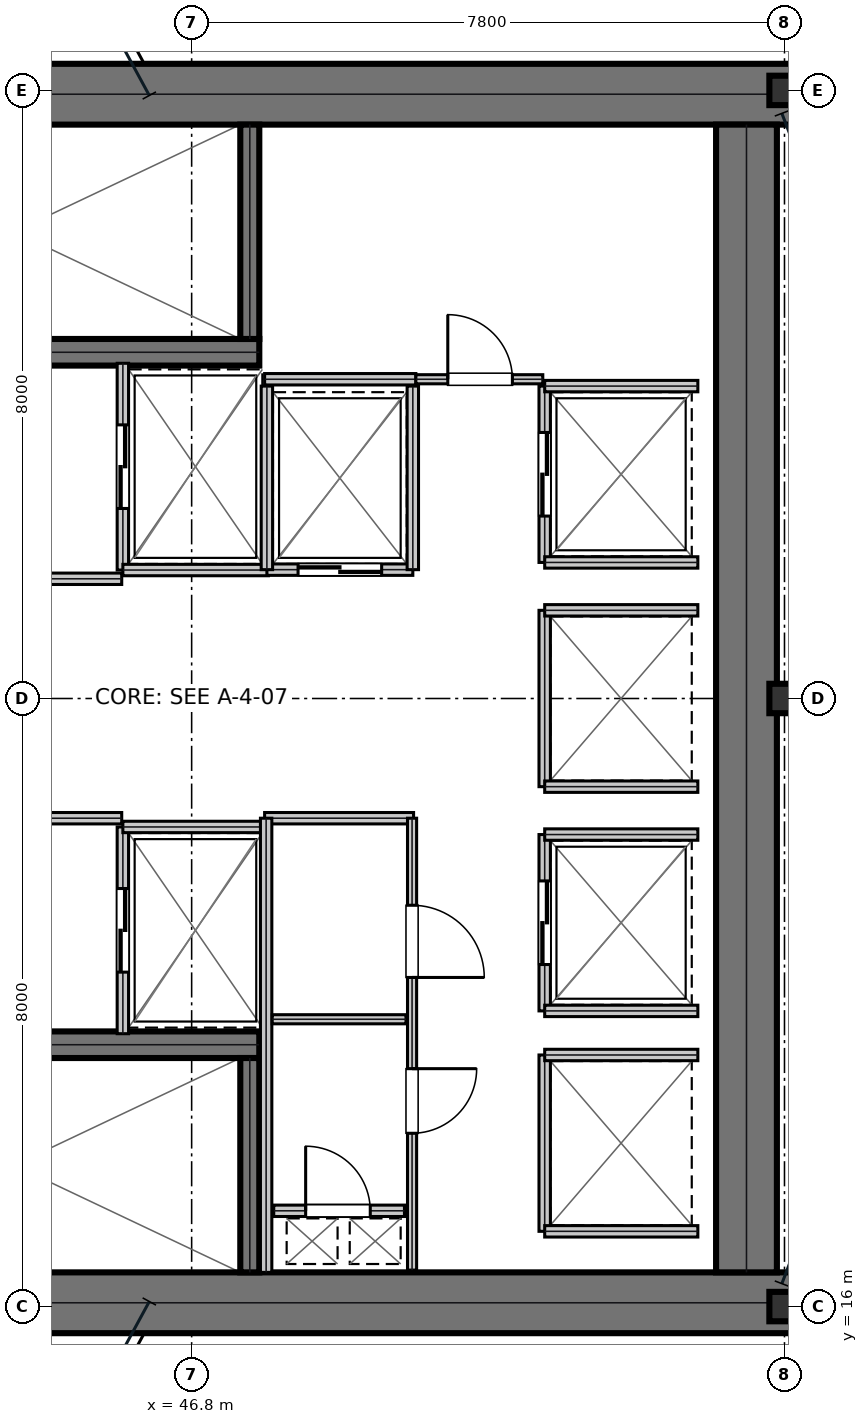
"""IFC4 building model, lengths in metres.
Left out: names, types, materials, properties, quantities, classifications, styles, units other than length and angle.
Written with IfcOpenShell. Run it as: python <this file> out.ifc"""

import sys

from ifc_helpers import new_model, si_unit, direction, frame, frame_2d, origin, origin_2d, place, context, subcontext, project, spatial, rectangle, i_section, extrude, element, fill, save


model = new_model("IFC4")
c1 = context("Model", 3, precision=1e-05, world=origin(), true_north=direction((0.0, 1.0)))
c2 = subcontext(c1, "Body", "Model", "MODEL_VIEW")
j1 = project(units=[si_unit("LENGTHUNIT", "METRE"), si_unit("PLANEANGLEUNIT", "RADIAN")], contexts=[c1])
p1 = place(None, origin())
s1 = spatial("IfcSite", under=j1, at=p1, CompositionType="ELEMENT")
p2 = place(p1, origin())
s2 = spatial("IfcBuilding", under=s1, at=p2, CompositionType="ELEMENT")
p3 = place(p2, frame((0.0, 0.0, 153.3)))
s3 = spatial("IfcBuildingStorey", under=s2, at=p3, CompositionType="ELEMENT", Elevation=153.3)
for number, where, z_axis, x_axis in (
    (1, (38.8, 31.95, 0.0), (0.0, 0.0, 1.0), (1.0, 0.0, 0.0)),
    (2, (38.8, 16.05, 0.0), (0.0, 0.0, 1.0), (1.0, 0.0, 0.0)),
):
    element("IfcWall", number, at=place(p3, frame(where, z_axis=z_axis, x_axis=x_axis)), inside=s3, PredefinedType="SHEAR", context=c2, shape_type="SweptSolid", body=[
        extrude(rectangle(XDim=16.0, YDim=0.8, at=frame_2d((8.0, 0.0))), origin(), (0.0, 0.0, 1.0), 3.81),
    ])
p4 = place(p3, frame((54.1, 16.45, 0.0), z_axis=(0.0, 0.0, 1.0), x_axis=(0.0, 1.0, 0.0)))
e3 = element("IfcWall", 3, at=p4, inside=s3, PredefinedType="SHEAR", context=c2, shape_type="SweptSolid", body=[
    extrude(rectangle(XDim=15.1, YDim=0.8, at=frame_2d((7.55, 0.0))), origin(), (0.0, 0.0, 1.0), 3.81),
])
p5 = place(p3, frame((39.98, 28.555, 0.0), z_axis=(0.0, 0.0, 1.0), x_axis=(1.0, 0.0, 0.0)))
e4 = element("IfcWall", 4, at=p5, inside=s3, PredefinedType="SHEAR", context=c2, shape_type="SweptSolid", body=[
    extrude(rectangle(XDim=7.71, YDim=0.35, at=frame_2d((3.855, 0.0))), origin(), (0.0, 0.0, 1.0), 3.81),
])
p6 = place(p5, frame((0.25, 0.0, 0.0)))
e5 = element("IfcOpeningElement", 5, at=p6, cuts=e4, PredefinedType="OPENING", context=c2, shape_type="SweptSolid", body=[
    extrude(rectangle(XDim=1.1, YDim=2.15, at=frame_2d((0.55, 1.075))), frame((0.0, 0.185, 0.0), z_axis=(0.0, -1.0, 0.0), x_axis=(1.0, 0.0, 0.0)), (0.0, 0.0, 1.0), 0.37),
])
p7 = place(p3, frame((39.98, 19.445, 0.0), z_axis=(0.0, 0.0, 1.0), x_axis=(1.0, 0.0, 0.0)))
e6 = element("IfcWall", 6, at=p7, inside=s3, PredefinedType="SHEAR", context=c2, shape_type="SweptSolid", body=[
    extrude(rectangle(XDim=7.71, YDim=0.35, at=frame_2d((3.855, 0.0))), origin(), (0.0, 0.0, 1.0), 3.81),
])
p8 = place(p7, frame((0.25, 0.0, 0.0)))
e7 = element("IfcOpeningElement", 7, at=p8, cuts=e6, PredefinedType="OPENING", context=c2, shape_type="SweptSolid", body=[
    extrude(rectangle(XDim=1.1, YDim=2.15, at=frame_2d((0.55, 1.075))), frame((0.0, 0.185, 0.0), z_axis=(0.0, -1.0, 0.0), x_axis=(1.0, 0.0, 0.0)), (0.0, 0.0, 1.0), 0.37),
])
for number, where, z_axis, x_axis in (
    (8, (47.565, 28.73, 0.0), (0.0, 0.0, 1.0), (0.0, 1.0, 0.0)),
    (9, (47.565, 16.45, 0.0), (0.0, 0.0, 1.0), (0.0, 1.0, 0.0)),
):
    element("IfcWall", number, at=place(p3, frame(where, z_axis=z_axis, x_axis=x_axis)), inside=s3, PredefinedType="SHEAR", context=c2, shape_type="SweptSolid", body=[
        extrude(rectangle(XDim=2.82, YDim=0.25, at=frame_2d((1.41, 0.0))), origin(), (0.0, 0.0, 1.0), 3.81),
    ])
for number, where, z_axis, x_axis in (
    (10, (54.6, 16.0, 0.0), (0.0, 0.0, 1.0), (1.0, 0.0, 0.0)),
    (11, (54.6, 24.0, 0.0), (0.0, 0.0, 1.0), (1.0, 0.0, 0.0)),
    (12, (54.6, 32.0, 0.0), (0.0, 0.0, 1.0), (1.0, 0.0, 0.0)),
):
    element("IfcColumn", number, at=place(p3, frame(where, z_axis=z_axis, x_axis=x_axis)), inside=s3, PredefinedType="COLUMN", context=c2, shape_type="SweptSolid", body=[
        extrude(i_section(OverallWidth=0.398, OverallDepth=0.387, WebThickness=0.021, FlangeThickness=0.033, at=origin_2d()), origin(), (0.0, 0.0, 1.0), 4.044),
    ])
p9 = place(p3, frame((39.98, 25.575, 0.0), z_axis=(0.0, 0.0, 1.0), x_axis=(1.0, 0.0, 0.0)))
e13 = element("IfcWall", 13, at=p9, inside=s3, PredefinedType="PARTITIONING", context=c2, shape_type="SweptSolid", body=[
    extrude(rectangle(XDim=5.9, YDim=0.15, at=frame_2d((2.95, 0.0))), origin(), (0.0, 0.0, 1.0), 3.81),
])
p10 = place(p9, frame((2.35, 0.0, 0.0)))
e14 = element("IfcOpeningElement", 14, at=p10, cuts=e13, PredefinedType="OPENING", context=c2, shape_type="SweptSolid", body=[
    extrude(rectangle(XDim=1.05, YDim=2.15, at=frame_2d((0.525, 1.075))), frame((0.0, 0.085, 0.0), z_axis=(0.0, -1.0, 0.0), x_axis=(1.0, 0.0, 0.0)), (0.0, 0.0, 1.0), 0.17),
])
p11 = place(p3, frame((39.98, 22.425, 0.0), z_axis=(0.0, 0.0, 1.0), x_axis=(1.0, 0.0, 0.0)))
e15 = element("IfcWall", 15, at=p11, inside=s3, PredefinedType="PARTITIONING", context=c2, shape_type="SweptSolid", body=[
    extrude(rectangle(XDim=5.9, YDim=0.15, at=frame_2d((2.95, 0.0))), origin(), (0.0, 0.0, 1.0), 3.81),
])
p12 = place(p11, frame((2.35, 0.0, 0.0)))
e16 = element("IfcOpeningElement", 16, at=p12, cuts=e15, PredefinedType="OPENING", context=c2, shape_type="SweptSolid", body=[
    extrude(rectangle(XDim=1.05, YDim=2.15, at=frame_2d((0.525, 1.075))), frame((0.0, 0.085, 0.0), z_axis=(0.0, -1.0, 0.0), x_axis=(1.0, 0.0, 0.0)), (0.0, 0.0, 1.0), 0.17),
])
p13 = place(p3, frame((45.895, 25.69, 0.0), z_axis=(0.0, 0.0, 1.0), x_axis=(0.0, 1.0, 0.0)))
e17 = element("IfcWall", 17, at=p13, inside=s3, PredefinedType="PARTITIONING", context=c2, shape_type="SweptSolid", body=[
    extrude(rectangle(XDim=2.72, YDim=0.15, at=frame_2d((1.36, 0.0))), origin(), (0.0, 0.0, 1.0), 3.81),
])
p14 = place(p13, frame((0.81, 0.0, 0.0)))
e18 = element("IfcOpeningElement", 18, at=p14, cuts=e17, PredefinedType="OPENING", context=c2, shape_type="SweptSolid", body=[
    extrude(rectangle(XDim=1.1, YDim=2.15, at=frame_2d((0.55, 1.075))), frame((0.0, 0.085, 0.0), z_axis=(0.0, -1.0, 0.0), x_axis=(1.0, 0.0, 0.0)), (0.0, 0.0, 1.0), 0.17),
])
p15 = place(p3, frame((45.895, 25.69, 0.0), z_axis=(0.0, 0.0, 1.0), x_axis=(1.0, 0.0, 0.0)))
e19 = element("IfcWall", 19, at=p15, inside=s3, PredefinedType="PARTITIONING", context=c2, shape_type="SweptSolid", body=[
    extrude(rectangle(XDim=1.915, YDim=0.15, at=frame_2d((0.958, 0.0))), origin(), (0.0, 0.0, 1.0), 3.81),
])
p16 = place(p3, frame((45.895, 19.59, 0.0), z_axis=(0.0, 0.0, 1.0), x_axis=(0.0, 1.0, 0.0)))
e20 = element("IfcWall", 20, at=p16, inside=s3, PredefinedType="PARTITIONING", context=c2, shape_type="SweptSolid", body=[
    extrude(rectangle(XDim=2.72, YDim=0.15, at=frame_2d((1.36, 0.0))), origin(), (0.0, 0.0, 1.0), 3.81),
])
p17 = place(p16, frame((0.81, 0.0, 0.0)))
e21 = element("IfcOpeningElement", 21, at=p17, cuts=e20, PredefinedType="OPENING", context=c2, shape_type="SweptSolid", body=[
    extrude(rectangle(XDim=1.1, YDim=2.15, at=frame_2d((0.55, 1.075))), frame((0.0, 0.085, 0.0), z_axis=(0.0, -1.0, 0.0), x_axis=(1.0, 0.0, 0.0)), (0.0, 0.0, 1.0), 0.17),
])
p18 = place(p3, frame((45.895, 22.31, 0.0), z_axis=(0.0, 0.0, 1.0), x_axis=(1.0, 0.0, 0.0)))
e22 = element("IfcWall", 22, at=p18, inside=s3, PredefinedType="PARTITIONING", context=c2, shape_type="SweptSolid", body=[
    extrude(rectangle(XDim=1.915, YDim=0.15, at=frame_2d((0.958, 0.0))), origin(), (0.0, 0.0, 1.0), 3.81),
])
p19 = place(p3, frame((47.79, 25.695, 0.0), z_axis=(0.0, 0.0, 1.0), x_axis=(1.0, 0.0, 0.0)))
e23 = element("IfcWall", 23, at=p19, inside=s3, PredefinedType="PARTITIONING", context=c2, shape_type="SweptSolid", body=[
    extrude(rectangle(XDim=1.92, YDim=0.15, at=frame_2d((0.96, 0.0))), origin(), (0.0, 0.0, 1.0), 3.81),
])
p20 = place(p19, frame((0.41, 0.0, 0.0)))
e24 = element("IfcOpeningElement", 24, at=p20, cuts=e23, PredefinedType="OPENING", context=c2, shape_type="SweptSolid", body=[
    extrude(rectangle(XDim=1.1, YDim=2.15, at=frame_2d((0.55, 1.075))), frame((0.0, 0.085, 0.0), z_axis=(0.0, -1.0, 0.0), x_axis=(1.0, 0.0, 0.0)), (0.0, 0.0, 1.0), 0.17),
])
for number, where, z_axis, x_axis in (
    (25, (47.79, 25.695, 0.0), (0.0, 0.0, 1.0), (0.0, 1.0, 0.0)),
    (26, (49.71, 25.695, 0.0), (0.0, 0.0, 1.0), (0.0, 1.0, 0.0)),
):
    element("IfcWall", number, at=place(p3, frame(where, z_axis=z_axis, x_axis=x_axis)), inside=s3, PredefinedType="PARTITIONING", context=c2, shape_type="SweptSolid", body=[
        extrude(rectangle(XDim=2.415, YDim=0.15, at=frame_2d((1.208, 0.0))), origin(), (0.0, 0.0, 1.0), 3.81),
    ])
p21 = place(p3, frame((51.445, 25.79, 0.0), z_axis=(0.0, 0.0, 1.0), x_axis=(0.0, 1.0, 0.0)))
e27 = element("IfcWall", 27, at=p21, inside=s3, PredefinedType="PARTITIONING", context=c2, shape_type="SweptSolid", body=[
    extrude(rectangle(XDim=2.32, YDim=0.15, at=frame_2d((1.16, 0.0))), origin(), (0.0, 0.0, 1.0), 3.81),
])
p22 = place(p21, frame((0.61, 0.0, 0.0)))
e28 = element("IfcOpeningElement", 28, at=p22, cuts=e27, PredefinedType="OPENING", context=c2, shape_type="SweptSolid", body=[
    extrude(rectangle(XDim=1.1, YDim=2.15, at=frame_2d((0.55, 1.075))), frame((0.0, 0.085, 0.0), z_axis=(0.0, -1.0, 0.0), x_axis=(1.0, 0.0, 0.0)), (0.0, 0.0, 1.0), 0.17),
])
for number, where, z_axis, x_axis in (
    (29, (51.445, 25.79, 0.0), (0.0, 0.0, 1.0), (1.0, 0.0, 0.0)),
    (30, (51.445, 28.11, 0.0), (0.0, 0.0, 1.0), (1.0, 0.0, 0.0)),
):
    element("IfcWall", number, at=place(p3, frame(where, z_axis=z_axis, x_axis=x_axis)), inside=s3, PredefinedType="PARTITIONING", context=c2, shape_type="SweptSolid", body=[
        extrude(rectangle(XDim=2.015, YDim=0.15, at=frame_2d((1.007, 0.0))), origin(), (0.0, 0.0, 1.0), 3.81),
    ])
p23 = place(p3, frame((51.445, 19.89, 0.0), z_axis=(0.0, 0.0, 1.0), x_axis=(0.0, 1.0, 0.0)))
e31 = element("IfcWall", 31, at=p23, inside=s3, PredefinedType="PARTITIONING", context=c2, shape_type="SweptSolid", body=[
    extrude(rectangle(XDim=2.32, YDim=0.15, at=frame_2d((1.16, 0.0))), origin(), (0.0, 0.0, 1.0), 3.81),
])
p24 = place(p23, frame((0.61, 0.0, 0.0)))
e32 = element("IfcOpeningElement", 32, at=p24, cuts=e31, PredefinedType="OPENING", context=c2, shape_type="SweptSolid", body=[
    extrude(rectangle(XDim=1.1, YDim=2.15, at=frame_2d((0.55, 1.075))), frame((0.0, 0.085, 0.0), z_axis=(0.0, -1.0, 0.0), x_axis=(1.0, 0.0, 0.0)), (0.0, 0.0, 1.0), 0.17),
])
for number, where, z_axis, x_axis in (
    (33, (51.445, 19.89, 0.0), (0.0, 0.0, 1.0), (1.0, 0.0, 0.0)),
    (34, (51.445, 22.21, 0.0), (0.0, 0.0, 1.0), (1.0, 0.0, 0.0)),
):
    element("IfcWall", number, at=place(p3, frame(where, z_axis=z_axis, x_axis=x_axis)), inside=s3, PredefinedType="PARTITIONING", context=c2, shape_type="SweptSolid", body=[
        extrude(rectangle(XDim=2.015, YDim=0.15, at=frame_2d((1.007, 0.0))), origin(), (0.0, 0.0, 1.0), 3.81),
    ])
p25 = place(p3, frame((51.445, 22.84, 0.0), z_axis=(0.0, 0.0, 1.0), x_axis=(0.0, 1.0, 0.0)))
e35 = element("IfcWall", 35, at=p25, inside=s3, PredefinedType="PARTITIONING", context=c2, shape_type="SweptSolid", body=[
    extrude(rectangle(XDim=2.32, YDim=0.15, at=frame_2d((1.16, 0.0))), origin(), (0.0, 0.0, 1.0), 3.81),
])
for number, where, z_axis, x_axis in (
    (36, (51.445, 22.84, 0.0), (0.0, 0.0, 1.0), (1.0, 0.0, 0.0)),
    (37, (51.445, 25.16, 0.0), (0.0, 0.0, 1.0), (1.0, 0.0, 0.0)),
):
    element("IfcWall", number, at=place(p3, frame(where, z_axis=z_axis, x_axis=x_axis)), inside=s3, PredefinedType="PARTITIONING", context=c2, shape_type="SweptSolid", body=[
        extrude(rectangle(XDim=2.015, YDim=0.15, at=frame_2d((1.007, 0.0))), origin(), (0.0, 0.0, 1.0), 3.81),
    ])
p26 = place(p3, frame((51.445, 16.99, 0.0), z_axis=(0.0, 0.0, 1.0), x_axis=(0.0, 1.0, 0.0)))
e38 = element("IfcWall", 38, at=p26, inside=s3, PredefinedType="PARTITIONING", context=c2, shape_type="SweptSolid", body=[
    extrude(rectangle(XDim=2.32, YDim=0.15, at=frame_2d((1.16, 0.0))), origin(), (0.0, 0.0, 1.0), 3.81),
])
for number, where, z_axis, x_axis in (
    (39, (51.445, 16.99, 0.0), (0.0, 0.0, 1.0), (1.0, 0.0, 0.0)),
    (40, (51.445, 19.31, 0.0), (0.0, 0.0, 1.0), (1.0, 0.0, 0.0)),
):
    element("IfcWall", number, at=place(p3, frame(where, z_axis=z_axis, x_axis=x_axis)), inside=s3, PredefinedType="PARTITIONING", context=c2, shape_type="SweptSolid", body=[
        extrude(rectangle(XDim=2.015, YDim=0.15, at=frame_2d((1.007, 0.0))), origin(), (0.0, 0.0, 1.0), 3.81),
    ])
p27 = place(p3, frame((47.88, 17.26, 0.0), z_axis=(0.0, 0.0, 1.0), x_axis=(1.0, 0.0, 0.0)))
e41 = element("IfcWall", 41, at=p27, inside=s3, PredefinedType="PARTITIONING", context=c2, shape_type="SweptSolid", body=[
    extrude(rectangle(XDim=1.72, YDim=0.15, at=frame_2d((0.86, 0.0))), origin(), (0.0, 0.0, 1.0), 3.81),
])
p28 = place(p27, frame((0.42, 0.0, 0.0)))
e42 = element("IfcOpeningElement", 42, at=p28, cuts=e41, PredefinedType="OPENING", context=c2, shape_type="SweptSolid", body=[
    extrude(rectangle(XDim=0.85, YDim=2.15, at=frame_2d((0.425, 1.075))), frame((0.0, 0.085, 0.0), z_axis=(0.0, -1.0, 0.0), x_axis=(1.0, 0.0, 0.0)), (0.0, 0.0, 1.0), 0.17),
])
p29 = place(p3, frame((47.76, 22.425, 0.0), z_axis=(0.0, 0.0, 1.0), x_axis=(1.0, 0.0, 0.0)))
e43 = element("IfcWall", 43, at=p29, inside=s3, PredefinedType="PARTITIONING", context=c2, shape_type="SweptSolid", body=[
    extrude(rectangle(XDim=1.96, YDim=0.15, at=frame_2d((0.98, 0.0))), origin(), (0.0, 0.0, 1.0), 3.81),
])
p30 = place(p3, frame((47.78, 16.45, 0.0), z_axis=(0.0, 0.0, 1.0), x_axis=(0.0, 1.0, 0.0)))
e44 = element("IfcWall", 44, at=p30, inside=s3, PredefinedType="PARTITIONING", context=c2, shape_type="SweptSolid", body=[
    extrude(rectangle(XDim=5.975, YDim=0.15, at=frame_2d((2.988, 0.0))), origin(), (0.0, 0.0, 1.0), 3.81),
])
p31 = place(p3, frame((47.86, 19.78, 0.0), z_axis=(0.0, 0.0, 1.0), x_axis=(1.0, 0.0, 0.0)))
e45 = element("IfcWall", 45, at=p31, inside=s3, PredefinedType="PARTITIONING", context=c2, shape_type="SweptSolid", body=[
    extrude(rectangle(XDim=1.76, YDim=0.12, at=frame_2d((0.88, 0.0))), origin(), (0.0, 0.0, 1.0), 3.81),
])
p32 = place(p3, frame((49.7, 16.48, 0.0), z_axis=(0.0, 0.0, 1.0), x_axis=(0.0, 1.0, 0.0)))
e46 = element("IfcWall", 46, at=p32, inside=s3, PredefinedType="PARTITIONING", context=c2, shape_type="SweptSolid", body=[
    extrude(rectangle(XDim=5.945, YDim=0.12, at=frame_2d((2.973, 0.0))), origin(), (0.0, 0.0, 1.0), 3.81),
])
p33 = place(p32, frame((1.8, 0.0, 0.0)))
e47 = element("IfcOpeningElement", 47, at=p33, cuts=e46, PredefinedType="OPENING", context=c2, shape_type="SweptSolid", body=[
    extrude(rectangle(XDim=0.85, YDim=2.15, at=frame_2d((0.425, 1.075))), frame((0.0, 0.07, 0.0), z_axis=(0.0, -1.0, 0.0), x_axis=(1.0, 0.0, 0.0)), (0.0, 0.0, 1.0), 0.14),
])
p34 = place(p32, frame((3.85, 0.0, 0.0)))
e48 = element("IfcOpeningElement", 48, at=p34, cuts=e46, PredefinedType="OPENING", context=c2, shape_type="SweptSolid", body=[
    extrude(rectangle(XDim=0.95, YDim=2.15, at=frame_2d((0.475, 1.075))), frame((0.0, 0.07, 0.0), z_axis=(0.0, -1.0, 0.0), x_axis=(1.0, 0.0, 0.0)), (0.0, 0.0, 1.0), 0.14),
])
p35 = place(p3, frame((47.76, 28.2, 0.0), z_axis=(0.0, 0.0, 1.0), x_axis=(1.0, 0.0, 0.0)))
e49 = element("IfcWall", 49, at=p35, inside=s3, PredefinedType="PARTITIONING", context=c2, shape_type="SweptSolid", body=[
    extrude(rectangle(XDim=1.99, YDim=0.15, at=frame_2d((0.995, 0.0))), origin(), (0.0, 0.0, 1.0), 3.81),
])
p36 = place(p3, frame((49.75, 28.2, 0.0), z_axis=(0.0, 0.0, 1.0), x_axis=(1.0, 0.0, 0.0)))
e50 = element("IfcWall", 50, at=p36, inside=s3, PredefinedType="PARTITIONING", context=c2, shape_type="SweptSolid", body=[
    extrude(rectangle(XDim=1.67, YDim=0.12, at=frame_2d((0.835, 0.0))), origin(), (0.0, 0.0, 1.0), 3.81),
])
p37 = place(p36, frame((0.42, 0.0, 0.0)))
e51 = element("IfcOpeningElement", 51, at=p37, cuts=e50, PredefinedType="OPENING", context=c2, shape_type="SweptSolid", body=[
    extrude(rectangle(XDim=0.85, YDim=2.15, at=frame_2d((0.425, 1.075))), frame((0.0, 0.07, 0.0), z_axis=(0.0, -1.0, 0.0), x_axis=(1.0, 0.0, 0.0)), (0.0, 0.0, 1.0), 0.14),
])
p38 = place(p14, frame((1.1, 0.0, 0.0), z_axis=(0.0, 0.0, 1.0), x_axis=(-1.0, 0.0, 0.0)))
e52 = element("IfcDoor", 52, at=p38, inside=s3, OperationType="DOUBLE_DOOR_SLIDING", PredefinedType="DOOR", context=c2, shape_type="SweptSolid", body=[
    extrude(rectangle(XDim=1.1, YDim=2.15, at=frame_2d((0.55, 1.075))), frame((0.0, 0.025, 0.0), z_axis=(0.0, -1.0, 0.0), x_axis=(1.0, 0.0, 0.0)), (0.0, 0.0, 1.0), 0.05),
])
fill(e18, e52)
p39 = place(p17, frame((1.1, 0.0, 0.0), z_axis=(0.0, 0.0, 1.0), x_axis=(-1.0, 0.0, 0.0)))
e53 = element("IfcDoor", 53, at=p39, inside=s3, OperationType="DOUBLE_DOOR_SLIDING", PredefinedType="DOOR", context=c2, shape_type="SweptSolid", body=[
    extrude(rectangle(XDim=1.1, YDim=2.15, at=frame_2d((0.55, 1.075))), frame((0.0, 0.025, 0.0), z_axis=(0.0, -1.0, 0.0), x_axis=(1.0, 0.0, 0.0)), (0.0, 0.0, 1.0), 0.05),
])
fill(e21, e53)
p40 = place(p20, frame((1.1, 0.0, 0.0), z_axis=(0.0, 0.0, 1.0), x_axis=(-1.0, 0.0, 0.0)))
e54 = element("IfcDoor", 54, at=p40, inside=s3, OperationType="DOUBLE_DOOR_SLIDING", PredefinedType="DOOR", context=c2, shape_type="SweptSolid", body=[
    extrude(rectangle(XDim=1.1, YDim=2.15, at=frame_2d((0.55, 1.075))), frame((0.0, 0.025, 0.0), z_axis=(0.0, -1.0, 0.0), x_axis=(1.0, 0.0, 0.0)), (0.0, 0.0, 1.0), 0.05),
])
fill(e24, e54)
p41 = place(p22, frame((1.1, 0.0, 0.0), z_axis=(0.0, 0.0, 1.0), x_axis=(-1.0, 0.0, 0.0)))
e55 = element("IfcDoor", 55, at=p41, inside=s3, OperationType="DOUBLE_DOOR_SLIDING", PredefinedType="DOOR", context=c2, shape_type="SweptSolid", body=[
    extrude(rectangle(XDim=1.1, YDim=2.15, at=frame_2d((0.55, 1.075))), frame((0.0, 0.025, 0.0), z_axis=(0.0, -1.0, 0.0), x_axis=(1.0, 0.0, 0.0)), (0.0, 0.0, 1.0), 0.05),
])
fill(e28, e55)
p42 = place(p24, frame((1.1, 0.0, 0.0), z_axis=(0.0, 0.0, 1.0), x_axis=(-1.0, 0.0, 0.0)))
e56 = element("IfcDoor", 56, at=p42, inside=s3, OperationType="DOUBLE_DOOR_SLIDING", PredefinedType="DOOR", context=c2, shape_type="SweptSolid", body=[
    extrude(rectangle(XDim=1.1, YDim=2.15, at=frame_2d((0.55, 1.075))), frame((0.0, 0.025, 0.0), z_axis=(0.0, -1.0, 0.0), x_axis=(1.0, 0.0, 0.0)), (0.0, 0.0, 1.0), 0.05),
])
fill(e32, e56)
p43 = place(p28, origin())
e57 = element("IfcDoor", 57, at=p43, inside=s3, OperationType="SINGLE_SWING_LEFT", PredefinedType="TRAPDOOR", context=c2, shape_type="SweptSolid", body=[
    extrude(rectangle(XDim=0.85, YDim=2.15, at=frame_2d((0.425, 1.075))), frame((0.0, 0.025, 0.0), z_axis=(0.0, -1.0, 0.0), x_axis=(1.0, 0.0, 0.0)), (0.0, 0.0, 1.0), 0.05),
])
fill(e42, e57)
p44 = place(p33, frame((0.85, 0.0, 0.0), z_axis=(0.0, 0.0, 1.0), x_axis=(-1.0, 0.0, 0.0)))
e58 = element("IfcDoor", 58, at=p44, inside=s3, OperationType="SINGLE_SWING_LEFT", PredefinedType="DOOR", context=c2, shape_type="SweptSolid", body=[
    extrude(rectangle(XDim=0.85, YDim=2.15, at=frame_2d((0.425, 1.075))), frame((0.0, 0.025, 0.0), z_axis=(0.0, -1.0, 0.0), x_axis=(1.0, 0.0, 0.0)), (0.0, 0.0, 1.0), 0.05),
])
fill(e47, e58)
p45 = place(p34, frame((0.95, 0.0, 0.0), z_axis=(0.0, 0.0, 1.0), x_axis=(-1.0, 0.0, 0.0)))
e59 = element("IfcDoor", 59, at=p45, inside=s3, OperationType="SINGLE_SWING_RIGHT", PredefinedType="DOOR", context=c2, shape_type="SweptSolid", body=[
    extrude(rectangle(XDim=0.95, YDim=2.15, at=frame_2d((0.475, 1.075))), frame((0.0, 0.025, 0.0), z_axis=(0.0, -1.0, 0.0), x_axis=(1.0, 0.0, 0.0)), (0.0, 0.0, 1.0), 0.05),
])
fill(e48, e59)
p46 = place(p37, origin())
e60 = element("IfcDoor", 60, at=p46, inside=s3, OperationType="SINGLE_SWING_LEFT", PredefinedType="DOOR", context=c2, shape_type="SweptSolid", body=[
    extrude(rectangle(XDim=0.85, YDim=2.15, at=frame_2d((0.425, 1.075))), frame((0.0, 0.025, 0.0), z_axis=(0.0, -1.0, 0.0), x_axis=(1.0, 0.0, 0.0)), (0.0, 0.0, 1.0), 0.05),
])
fill(e51, e60)
save(model, sys.argv[1])
